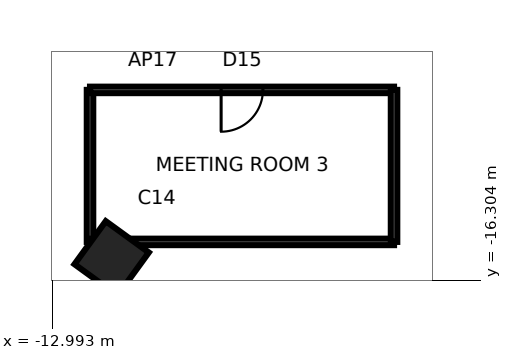
"""IFC4 building model, lengths in metres.
Left out: names, types, materials, properties, quantities, classifications, styles, units other than length and angle.
Written with IfcOpenShell. Run it as: python <this file> out.ifc"""

import sys

from ifc_helpers import new_model, si_unit, direction, frame, frame_2d, origin, origin_2d, place, context, subcontext, project, spatial, rectangle, extrude, element, fill, save


model = new_model("IFC4")
c1 = context("Model", 3, precision=1e-05, world=origin(), true_north=direction((0.0, 1.0)))
c2 = subcontext(c1, "Body", "Model", "MODEL_VIEW")
j1 = project(units=[si_unit("LENGTHUNIT", "METRE"), si_unit("PLANEANGLEUNIT", "RADIAN")], contexts=[c1])
p1 = place(None, origin())
s1 = spatial("IfcSite", under=j1, at=p1, CompositionType="ELEMENT")
p2 = place(p1, origin())
s2 = spatial("IfcBuilding", under=s1, at=p2, CompositionType="ELEMENT")
p3 = place(p2, frame((0.0, 0.0, 172.1)))
s3 = spatial("IfcBuildingStorey", under=s2, at=p3, CompositionType="ELEMENT", Elevation=172.1)
p4 = place(p3, frame((-11.43, -15.733, 0.0), z_axis=(0.0, 0.0, 1.0), x_axis=(-0.587785252292, -0.809016994375, 0.0)))
e1 = element("IfcColumn", 1, at=p4, inside=s3, PredefinedType="COLUMN", context=c2, shape_type="SweptSolid", body=[
    extrude(rectangle(XDim=1.4, YDim=1.4, at=origin_2d()), origin(), (0.0, 0.0, 1.0), 3.9),
])
p5 = place(p3, frame((-12.0, -15.3, 0.0), z_axis=(0.0, 0.0, 1.0), x_axis=(0.0, 1.0, 0.0)))
e2 = element("IfcWall", 2, at=p5, inside=s3, PredefinedType="PARTITIONING", context=c2, shape_type="SweptSolid", body=[
    extrude(rectangle(XDim=4.0, YDim=0.17, at=frame_2d((2.0, 0.0))), origin(), (0.0, 0.0, 1.0), 3.74),
])
p6 = place(p3, frame((-12.0, -11.3, 0.0), z_axis=(0.0, 0.0, 1.0), x_axis=(1.0, 0.0, 0.0)))
e3 = element("IfcWall", 3, at=p6, inside=s3, PredefinedType="PARTITIONING", context=c2, shape_type="SweptSolid", body=[
    extrude(rectangle(XDim=8.0, YDim=0.17, at=frame_2d((4.0, 0.0))), origin(), (0.0, 0.0, 1.0), 3.74),
])
p7 = place(p6, frame((3.45, 0.0, 0.0)))
e4 = element("IfcOpeningElement", 4, at=p7, cuts=e3, PredefinedType="OPENING", context=c2, shape_type="SweptSolid", body=[
    extrude(rectangle(XDim=1.1, YDim=2.4, at=frame_2d((0.55, 1.2))), frame((0.0, 0.095, 0.0), z_axis=(0.0, -1.0, 0.0), x_axis=(1.0, 0.0, 0.0)), (0.0, 0.0, 1.0), 0.19),
])
p8 = place(p3, frame((-4.0, -15.3, 0.0), z_axis=(0.0, 0.0, 1.0), x_axis=(-1.0, 0.0, 0.0)))
e5 = element("IfcWall", 5, at=p8, inside=s3, PredefinedType="PARTITIONING", context=c2, shape_type="SweptSolid", body=[
    extrude(rectangle(XDim=8.0, YDim=0.17, at=frame_2d((4.0, 0.0))), origin(), (0.0, 0.0, 1.0), 3.334),
])
p9 = place(p3, frame((-4.0, -11.3, 0.0), z_axis=(0.0, 0.0, 1.0), x_axis=(0.0, -1.0, 0.0)))
e6 = element("IfcWall", 6, at=p9, inside=s3, PredefinedType="PARTITIONING", context=c2, shape_type="SweptSolid", body=[
    extrude(rectangle(XDim=4.0, YDim=0.17, at=frame_2d((2.0, 0.0))), origin(), (0.0, 0.0, 1.0), 3.74),
])
p10 = place(p7, frame((1.1, 0.0, 0.0), z_axis=(0.0, 0.0, 1.0), x_axis=(-1.0, 0.0, 0.0)))
e7 = element("IfcDoor", 7, at=p10, inside=s3, OperationType="SINGLE_SWING_RIGHT", PredefinedType="DOOR", context=c2, shape_type="SweptSolid", body=[
    extrude(rectangle(XDim=1.1, YDim=2.4, at=frame_2d((0.55, 1.2))), frame((0.0, 0.025, 0.0), z_axis=(0.0, -1.0, 0.0), x_axis=(1.0, 0.0, 0.0)), (0.0, 0.0, 1.0), 0.05),
])
fill(e4, e7)
save(model, sys.argv[1])
